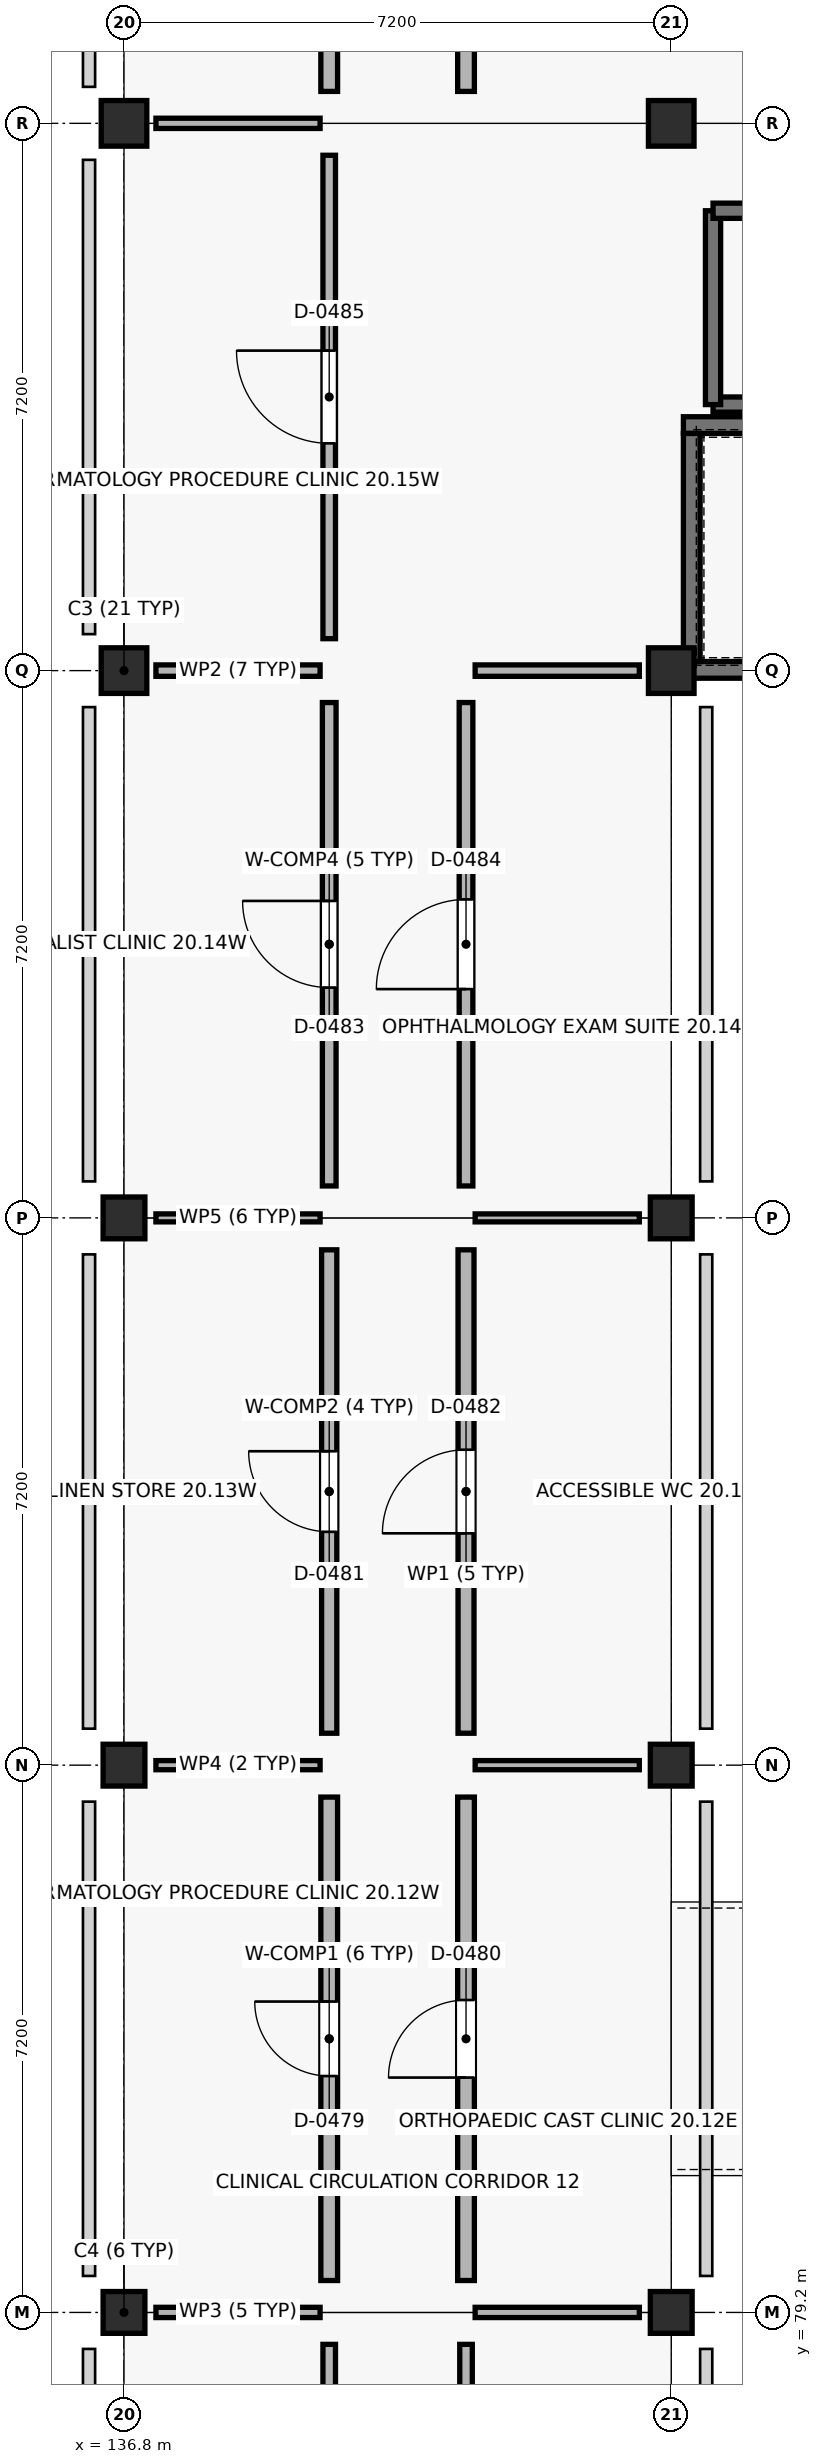
"""IFC4 building model, lengths in metres.
Left out: names, types, materials, properties, quantities, classifications, styles, units other than length and angle.
Written with IfcOpenShell. Run it as: python <this file> out.ifc"""

import sys

from ifc_helpers import new_model, si_unit, direction, frame, frame_2d, origin, origin_2d, place, context, subcontext, project, spatial, rectangle, extrude, element, fill, save


model = new_model("IFC4")
c1 = context("Model", 3, precision=1e-05, world=origin(), true_north=direction((0.0, 1.0)))
c2 = subcontext(c1, "Body", "Model", "MODEL_VIEW")
j1 = project(units=[si_unit("LENGTHUNIT", "METRE"), si_unit("PLANEANGLEUNIT", "RADIAN")], contexts=[c1])
p1 = place(None, origin())
s1 = spatial("IfcSite", under=j1, at=p1, CompositionType="ELEMENT")
p2 = place(p1, origin())
s2 = spatial("IfcBuilding", under=s1, at=p2, CompositionType="ELEMENT")
p3 = place(p2, frame((0.0, 0.0, 9.0)))
s3 = spatial("IfcBuildingStorey", under=s2, at=p3, CompositionType="ELEMENT", Elevation=9.0)
for number, where, z_axis, x_axis in (
    (1, (136.8, 79.2, 0.0), (0.0, 0.0, 1.0), (1.0, 0.0, 0.0)),
    (2, (136.8, 86.4, 0.0), (0.0, 0.0, 1.0), (1.0, 0.0, 0.0)),
    (3, (136.8, 93.6, 0.0), (0.0, 0.0, 1.0), (1.0, 0.0, 0.0)),
):
    element("IfcColumn", number, at=place(p3, frame(where, z_axis=z_axis, x_axis=x_axis)), inside=s3, PredefinedType="COLUMN", context=c2, shape_type="SweptSolid", body=[
        extrude(rectangle(XDim=0.55, YDim=0.55, at=origin_2d()), origin(), (0.0, 0.0, 1.0), 4.5),
    ])
for number, where, z_axis, x_axis in (
    (4, (136.8, 100.8, 0.0), (0.0, 0.0, 1.0), (1.0, 0.0, 0.0)),
    (5, (136.8, 108.0, 0.0), (0.0, 0.0, 1.0), (1.0, 0.0, 0.0)),
):
    element("IfcColumn", number, at=place(p3, frame(where, z_axis=z_axis, x_axis=x_axis)), inside=s3, PredefinedType="COLUMN", context=c2, shape_type="SweptSolid", body=[
        extrude(rectangle(XDim=0.6, YDim=0.6, at=origin_2d()), origin(), (0.0, 0.0, 1.0), 4.5),
    ])
for number, where, z_axis, x_axis in (
    (6, (144.0, 79.2, 0.0), (0.0, 0.0, 1.0), (1.0, 0.0, 0.0)),
    (7, (144.0, 86.4, 0.0), (0.0, 0.0, 1.0), (1.0, 0.0, 0.0)),
    (8, (144.0, 93.6, 0.0), (0.0, 0.0, 1.0), (1.0, 0.0, 0.0)),
):
    element("IfcColumn", number, at=place(p3, frame(where, z_axis=z_axis, x_axis=x_axis)), inside=s3, PredefinedType="COLUMN", context=c2, shape_type="SweptSolid", body=[
        extrude(rectangle(XDim=0.55, YDim=0.55, at=origin_2d()), origin(), (0.0, 0.0, 1.0), 4.5),
    ])
for number, where, z_axis, x_axis in (
    (9, (144.0, 100.8, 0.0), (0.0, 0.0, 1.0), (1.0, 0.0, 0.0)),
    (10, (144.0, 108.0, 0.0), (0.0, 0.0, 1.0), (1.0, 0.0, 0.0)),
):
    element("IfcColumn", number, at=place(p3, frame(where, z_axis=z_axis, x_axis=x_axis)), inside=s3, PredefinedType="COLUMN", context=c2, shape_type="SweptSolid", body=[
        extrude(rectangle(XDim=0.6, YDim=0.6, at=origin_2d()), origin(), (0.0, 0.0, 1.0), 4.5),
    ])
p4 = place(p3, frame((144.16, 100.81, 0.0), z_axis=(0.0, 0.0, 1.0), x_axis=(1.0, 0.0, 0.0)))
e11 = element("IfcWall", 11, at=p4, inside=s3, PredefinedType="SHEAR", context=c2, shape_type="SweptSolid", body=[
    extrude(rectangle(XDim=6.88, YDim=0.22, at=frame_2d((3.44, 0.0))), origin(), (0.0, 0.0, 1.0), 4.24),
])
p5 = place(p3, frame((144.16, 104.03, 0.0), z_axis=(0.0, 0.0, 1.0), x_axis=(1.0, 0.0, 0.0)))
e12 = element("IfcWall", 12, at=p5, inside=s3, PredefinedType="SHEAR", context=c2, shape_type="SweptSolid", body=[
    extrude(rectangle(XDim=6.88, YDim=0.22, at=frame_2d((3.44, 0.0))), origin(), (0.0, 0.0, 1.0), 4.24),
])
p6 = place(p5, frame((5.25, 0.0, 0.0)))
e13 = element("IfcOpeningElement", 13, at=p6, cuts=e12, PredefinedType="OPENING", context=c2, shape_type="SweptSolid", body=[
    extrude(rectangle(XDim=1.2, YDim=2.15, at=frame_2d((0.6, 1.075))), frame((0.0, 0.12, 0.0), z_axis=(0.0, -1.0, 0.0), x_axis=(1.0, 0.0, 0.0)), (0.0, 0.0, 1.0), 0.24),
])
p7 = place(p3, frame((144.27, 100.92, 0.0), z_axis=(0.0, 0.0, 1.0), x_axis=(0.0, 1.0, 0.0)))
e14 = element("IfcWall", 14, at=p7, inside=s3, PredefinedType="SHEAR", context=c2, shape_type="SweptSolid", body=[
    extrude(rectangle(XDim=3.0, YDim=0.22, at=frame_2d((1.5, 0.0))), origin(), (0.0, 0.0, 1.0), 4.24),
])
p8 = place(p3, frame((144.55, 104.3, 0.0), z_axis=(0.0, 0.0, 1.0), x_axis=(1.0, 0.0, 0.0)))
e15 = element("IfcWall", 15, at=p8, inside=s3, PredefinedType="SHEAR", context=c2, shape_type="SweptSolid", body=[
    extrude(rectangle(XDim=2.1, YDim=0.2, at=frame_2d((1.05, 0.0))), origin(), (0.0, 0.0, 1.0), 4.24),
])
p9 = place(p3, frame((144.55, 104.3, 0.0), z_axis=(0.0, 0.0, 1.0), x_axis=(0.0, 1.0, 0.0)))
e16 = element("IfcWall", 16, at=p9, inside=s3, PredefinedType="SHEAR", context=c2, shape_type="SweptSolid", body=[
    extrude(rectangle(XDim=2.55, YDim=0.2, at=frame_2d((1.275, 0.0))), origin(), (0.0, 0.0, 1.0), 4.24),
])
p10 = place(p3, frame((144.55, 106.85, 0.0), z_axis=(0.0, 0.0, 1.0), x_axis=(1.0, 0.0, 0.0)))
e17 = element("IfcWall", 17, at=p10, inside=s3, PredefinedType="SHEAR", context=c2, shape_type="SweptSolid", body=[
    extrude(rectangle(XDim=2.1, YDim=0.2, at=frame_2d((1.05, 0.0))), origin(), (0.0, 0.0, 1.0), 4.24),
])
p11 = place(p3, frame((139.5, 72.42, 0.0), z_axis=(0.0, 0.0, 1.0), x_axis=(0.0, 1.0, 0.0)))
e18 = element("IfcWall", 18, at=p11, inside=s3, PredefinedType="PARTITIONING", context=c2, shape_type="SweptSolid", body=[
    extrude(rectangle(XDim=6.36, YDim=0.165, at=frame_2d((3.18, 0.0))), origin(), (0.0, 0.0, 1.0), 3.38),
])
p12 = place(p11, frame((2.73, 0.0, 0.0)))
e19 = element("IfcOpeningElement", 19, at=p12, cuts=e18, PredefinedType="OPENING", context=c2, shape_type="SweptSolid", body=[
    extrude(rectangle(XDim=0.9, YDim=2.19, at=frame_2d((0.45, 1.095))), frame((0.0, 0.093, 0.0), z_axis=(0.0, -1.0, 0.0), x_axis=(1.0, 0.0, 0.0)), (0.0, 0.0, 1.0), 0.185),
])
p13 = place(p3, frame((137.22, 79.2, 0.0), z_axis=(0.0, 0.0, 1.0), x_axis=(1.0, 0.0, 0.0)))
e20 = element("IfcWall", 20, at=p13, inside=s3, PredefinedType="PARTITIONING", context=c2, shape_type="SweptSolid", body=[
    extrude(rectangle(XDim=2.16, YDim=0.135, at=frame_2d((1.08, 0.0))), origin(), (0.0, 0.0, 1.0), 3.38),
])
p14 = place(p3, frame((141.3, 72.42, 0.0), z_axis=(0.0, 0.0, 1.0), x_axis=(0.0, 1.0, 0.0)))
e21 = element("IfcWall", 21, at=p14, inside=s3, PredefinedType="PARTITIONING", context=c2, shape_type="SweptSolid", body=[
    extrude(rectangle(XDim=6.36, YDim=0.165, at=frame_2d((3.18, 0.0))), origin(), (0.0, 0.0, 1.0), 3.38),
])
p15 = place(p14, frame((2.71, 0.0, 0.0)))
e22 = element("IfcOpeningElement", 22, at=p15, cuts=e21, PredefinedType="OPENING", context=c2, shape_type="SweptSolid", body=[
    extrude(rectangle(XDim=0.94, YDim=2.19, at=frame_2d((0.47, 1.095))), frame((0.0, 0.093, 0.0), z_axis=(0.0, -1.0, 0.0), x_axis=(1.0, 0.0, 0.0)), (0.0, 0.0, 1.0), 0.185),
])
p16 = place(p3, frame((141.42, 79.2, 0.0), z_axis=(0.0, 0.0, 1.0), x_axis=(1.0, 0.0, 0.0)))
e23 = element("IfcWall", 23, at=p16, inside=s3, PredefinedType="PARTITIONING", context=c2, shape_type="SweptSolid", body=[
    extrude(rectangle(XDim=2.16, YDim=0.135, at=frame_2d((1.08, 0.0))), origin(), (0.0, 0.0, 1.0), 3.38),
])
p17 = place(p3, frame((139.5, 79.62, 0.0), z_axis=(0.0, 0.0, 1.0), x_axis=(0.0, 1.0, 0.0)))
e24 = element("IfcWall", 24, at=p17, inside=s3, PredefinedType="SOLIDWALL", context=c2, shape_type="SweptSolid", body=[
    extrude(rectangle(XDim=6.36, YDim=0.22, at=frame_2d((3.18, 0.0))), origin(), (0.0, 0.0, 1.0), 3.38),
])
p18 = place(p17, frame((2.69, 0.0, 0.0)))
e25 = element("IfcOpeningElement", 25, at=p18, cuts=e24, PredefinedType="OPENING", context=c2, shape_type="SweptSolid", body=[
    extrude(rectangle(XDim=0.98, YDim=2.19, at=frame_2d((0.49, 1.095))), frame((0.0, 0.12, 0.0), z_axis=(0.0, -1.0, 0.0), x_axis=(1.0, 0.0, 0.0)), (0.0, 0.0, 1.0), 0.24),
])
p19 = place(p3, frame((137.22, 86.4, 0.0), z_axis=(0.0, 0.0, 1.0), x_axis=(1.0, 0.0, 0.0)))
e26 = element("IfcWall", 26, at=p19, inside=s3, PredefinedType="PARTITIONING", context=c2, shape_type="SweptSolid", body=[
    extrude(rectangle(XDim=2.16, YDim=0.12, at=frame_2d((1.08, 0.0))), origin(), (0.0, 0.0, 1.0), 3.38),
])
p20 = place(p3, frame((141.3, 79.62, 0.0), z_axis=(0.0, 0.0, 1.0), x_axis=(0.0, 1.0, 0.0)))
e27 = element("IfcWall", 27, at=p20, inside=s3, PredefinedType="SOLIDWALL", context=c2, shape_type="SweptSolid", body=[
    extrude(rectangle(XDim=6.36, YDim=0.22, at=frame_2d((3.18, 0.0))), origin(), (0.0, 0.0, 1.0), 3.38),
])
p21 = place(p20, frame((2.67, 0.0, 0.0)))
e28 = element("IfcOpeningElement", 28, at=p21, cuts=e27, PredefinedType="OPENING", context=c2, shape_type="SweptSolid", body=[
    extrude(rectangle(XDim=1.02, YDim=2.19, at=frame_2d((0.51, 1.095))), frame((0.0, 0.12, 0.0), z_axis=(0.0, -1.0, 0.0), x_axis=(1.0, 0.0, 0.0)), (0.0, 0.0, 1.0), 0.24),
])
p22 = place(p3, frame((141.42, 86.4, 0.0), z_axis=(0.0, 0.0, 1.0), x_axis=(1.0, 0.0, 0.0)))
e29 = element("IfcWall", 29, at=p22, inside=s3, PredefinedType="PARTITIONING", context=c2, shape_type="SweptSolid", body=[
    extrude(rectangle(XDim=2.16, YDim=0.12, at=frame_2d((1.08, 0.0))), origin(), (0.0, 0.0, 1.0), 3.38),
])
p23 = place(p3, frame((139.5, 86.82, 0.0), z_axis=(0.0, 0.0, 1.0), x_axis=(0.0, 1.0, 0.0)))
e30 = element("IfcWall", 30, at=p23, inside=s3, PredefinedType="SOLIDWALL", context=c2, shape_type="SweptSolid", body=[
    extrude(rectangle(XDim=6.36, YDim=0.2, at=frame_2d((3.18, 0.0))), origin(), (0.0, 0.0, 1.0), 3.38),
])
p24 = place(p23, frame((2.65, 0.0, 0.0)))
e31 = element("IfcOpeningElement", 31, at=p24, cuts=e30, PredefinedType="OPENING", context=c2, shape_type="SweptSolid", body=[
    extrude(rectangle(XDim=1.06, YDim=2.19, at=frame_2d((0.53, 1.095))), frame((0.0, 0.11, 0.0), z_axis=(0.0, -1.0, 0.0), x_axis=(1.0, 0.0, 0.0)), (0.0, 0.0, 1.0), 0.22),
])
p25 = place(p3, frame((137.22, 93.6, 0.0), z_axis=(0.0, 0.0, 1.0), x_axis=(1.0, 0.0, 0.0)))
e32 = element("IfcWall", 32, at=p25, inside=s3, PredefinedType="PARTITIONING", context=c2, shape_type="SweptSolid", body=[
    extrude(rectangle(XDim=2.16, YDim=0.105, at=frame_2d((1.08, 0.0))), origin(), (0.0, 0.0, 1.0), 3.38),
])
p26 = place(p3, frame((141.3, 86.82, 0.0), z_axis=(0.0, 0.0, 1.0), x_axis=(0.0, 1.0, 0.0)))
e33 = element("IfcWall", 33, at=p26, inside=s3, PredefinedType="PLUMBINGWALL", context=c2, shape_type="SweptSolid", body=[
    extrude(rectangle(XDim=6.36, YDim=0.21, at=frame_2d((3.18, 0.0))), origin(), (0.0, 0.0, 1.0), 3.38),
])
p27 = place(p26, frame((2.63, 0.0, 0.0)))
e34 = element("IfcOpeningElement", 34, at=p27, cuts=e33, PredefinedType="OPENING", context=c2, shape_type="SweptSolid", body=[
    extrude(rectangle(XDim=1.1, YDim=2.19, at=frame_2d((0.55, 1.095))), frame((0.0, 0.115, 0.0), z_axis=(0.0, -1.0, 0.0), x_axis=(1.0, 0.0, 0.0)), (0.0, 0.0, 1.0), 0.23),
])
p28 = place(p3, frame((141.42, 93.6, 0.0), z_axis=(0.0, 0.0, 1.0), x_axis=(1.0, 0.0, 0.0)))
e35 = element("IfcWall", 35, at=p28, inside=s3, PredefinedType="PARTITIONING", context=c2, shape_type="SweptSolid", body=[
    extrude(rectangle(XDim=2.16, YDim=0.105, at=frame_2d((1.08, 0.0))), origin(), (0.0, 0.0, 1.0), 3.38),
])
p29 = place(p3, frame((139.5, 94.02, 0.0), z_axis=(0.0, 0.0, 1.0), x_axis=(0.0, 1.0, 0.0)))
e36 = element("IfcWall", 36, at=p29, inside=s3, PredefinedType="PARTITIONING", context=c2, shape_type="SweptSolid", body=[
    extrude(rectangle(XDim=6.36, YDim=0.18, at=frame_2d((3.18, 0.0))), origin(), (0.0, 0.0, 1.0), 3.38),
])
p30 = place(p29, frame((2.61, 0.0, 0.0)))
e37 = element("IfcOpeningElement", 37, at=p30, cuts=e36, PredefinedType="OPENING", context=c2, shape_type="SweptSolid", body=[
    extrude(rectangle(XDim=1.14, YDim=2.19, at=frame_2d((0.57, 1.095))), frame((0.0, 0.1, 0.0), z_axis=(0.0, -1.0, 0.0), x_axis=(1.0, 0.0, 0.0)), (0.0, 0.0, 1.0), 0.2),
])
p31 = place(p3, frame((137.22, 100.8, 0.0), z_axis=(0.0, 0.0, 1.0), x_axis=(1.0, 0.0, 0.0)))
e38 = element("IfcWall", 38, at=p31, inside=s3, PredefinedType="PARTITIONING", context=c2, shape_type="SweptSolid", body=[
    extrude(rectangle(XDim=2.16, YDim=0.15, at=frame_2d((1.08, 0.0))), origin(), (0.0, 0.0, 1.0), 3.38),
])
p32 = place(p3, frame((141.3, 94.02, 0.0), z_axis=(0.0, 0.0, 1.0), x_axis=(0.0, 1.0, 0.0)))
e39 = element("IfcWall", 39, at=p32, inside=s3, PredefinedType="PARTITIONING", context=c2, shape_type="SweptSolid", body=[
    extrude(rectangle(XDim=6.36, YDim=0.18, at=frame_2d((3.18, 0.0))), origin(), (0.0, 0.0, 1.0), 3.38),
])
p33 = place(p32, frame((2.59, 0.0, 0.0)))
e40 = element("IfcOpeningElement", 40, at=p33, cuts=e39, PredefinedType="OPENING", context=c2, shape_type="SweptSolid", body=[
    extrude(rectangle(XDim=1.18, YDim=2.19, at=frame_2d((0.59, 1.095))), frame((0.0, 0.1, 0.0), z_axis=(0.0, -1.0, 0.0), x_axis=(1.0, 0.0, 0.0)), (0.0, 0.0, 1.0), 0.2),
])
p34 = place(p3, frame((141.42, 100.8, 0.0), z_axis=(0.0, 0.0, 1.0), x_axis=(1.0, 0.0, 0.0)))
e41 = element("IfcWall", 41, at=p34, inside=s3, PredefinedType="PARTITIONING", context=c2, shape_type="SweptSolid", body=[
    extrude(rectangle(XDim=2.16, YDim=0.15, at=frame_2d((1.08, 0.0))), origin(), (0.0, 0.0, 1.0), 3.38),
])
p35 = place(p3, frame((139.5, 101.22, 0.0), z_axis=(0.0, 0.0, 1.0), x_axis=(0.0, 1.0, 0.0)))
e42 = element("IfcWall", 42, at=p35, inside=s3, PredefinedType="PARTITIONING", context=c2, shape_type="SweptSolid", body=[
    extrude(rectangle(XDim=6.36, YDim=0.165, at=frame_2d((3.18, 0.0))), origin(), (0.0, 0.0, 1.0), 3.38),
])
p36 = place(p35, frame((2.57, 0.0, 0.0)))
e43 = element("IfcOpeningElement", 43, at=p36, cuts=e42, PredefinedType="OPENING", context=c2, shape_type="SweptSolid", body=[
    extrude(rectangle(XDim=1.22, YDim=2.19, at=frame_2d((0.61, 1.095))), frame((0.0, 0.093, 0.0), z_axis=(0.0, -1.0, 0.0), x_axis=(1.0, 0.0, 0.0)), (0.0, 0.0, 1.0), 0.185),
])
p37 = place(p3, frame((137.22, 108.0, 0.0), z_axis=(0.0, 0.0, 1.0), x_axis=(1.0, 0.0, 0.0)))
e44 = element("IfcWall", 44, at=p37, inside=s3, PredefinedType="PARTITIONING", context=c2, shape_type="SweptSolid", body=[
    extrude(rectangle(XDim=2.16, YDim=0.135, at=frame_2d((1.08, 0.0))), origin(), (0.0, 0.0, 1.0), 3.38),
])
p38 = place(p3, frame((139.5, 108.42, 0.0), z_axis=(0.0, 0.0, 1.0), x_axis=(0.0, 1.0, 0.0)))
e45 = element("IfcWall", 45, at=p38, inside=s3, PredefinedType="SOLIDWALL", context=c2, shape_type="SweptSolid", body=[
    extrude(rectangle(XDim=6.36, YDim=0.22, at=frame_2d((3.18, 0.0))), origin(), (0.0, 0.0, 1.0), 3.38),
])
p39 = place(p38, frame((2.55, 0.0, 0.0)))
e46 = element("IfcOpeningElement", 46, at=p39, cuts=e45, PredefinedType="OPENING", context=c2, shape_type="SweptSolid", body=[
    extrude(rectangle(XDim=1.26, YDim=2.19, at=frame_2d((0.63, 1.095))), frame((0.0, 0.12, 0.0), z_axis=(0.0, -1.0, 0.0), x_axis=(1.0, 0.0, 0.0)), (0.0, 0.0, 1.0), 0.24),
])
p40 = place(p3, frame((141.3, 108.42, 0.0), z_axis=(0.0, 0.0, 1.0), x_axis=(0.0, 1.0, 0.0)))
e47 = element("IfcWall", 47, at=p40, inside=s3, PredefinedType="SOLIDWALL", context=c2, shape_type="SweptSolid", body=[
    extrude(rectangle(XDim=6.36, YDim=0.22, at=frame_2d((3.18, 0.0))), origin(), (0.0, 0.0, 1.0), 3.38),
])
p41 = place(p40, frame((2.53, 0.0, 0.0)))
e48 = element("IfcOpeningElement", 48, at=p41, cuts=e47, PredefinedType="OPENING", context=c2, shape_type="SweptSolid", body=[
    extrude(rectangle(XDim=1.3, YDim=2.19, at=frame_2d((0.65, 1.095))), frame((0.0, 0.12, 0.0), z_axis=(0.0, -1.0, 0.0), x_axis=(1.0, 0.0, 0.0)), (0.0, 0.0, 1.0), 0.24),
])
p42 = place(p18, origin())
e49 = element("IfcDoor", 49, at=p42, inside=s3, OperationType="SINGLE_SWING_RIGHT", PredefinedType="DOOR", context=c2, shape_type="SweptSolid", body=[
    extrude(rectangle(XDim=0.98, YDim=2.19, at=frame_2d((0.49, 1.095))), frame((0.0, 0.025, 0.0), z_axis=(0.0, -1.0, 0.0), x_axis=(1.0, 0.0, 0.0)), (0.0, 0.0, 1.0), 0.05),
])
fill(e25, e49)
p43 = place(p21, origin())
e50 = element("IfcDoor", 50, at=p43, inside=s3, OperationType="SINGLE_SWING_LEFT", PredefinedType="DOOR", context=c2, shape_type="SweptSolid", body=[
    extrude(rectangle(XDim=1.02, YDim=2.19, at=frame_2d((0.51, 1.095))), frame((0.0, 0.025, 0.0), z_axis=(0.0, -1.0, 0.0), x_axis=(1.0, 0.0, 0.0)), (0.0, 0.0, 1.0), 0.05),
])
fill(e28, e50)
p44 = place(p24, origin())
e51 = element("IfcDoor", 51, at=p44, inside=s3, OperationType="SINGLE_SWING_RIGHT", PredefinedType="DOOR", context=c2, shape_type="SweptSolid", body=[
    extrude(rectangle(XDim=1.06, YDim=2.19, at=frame_2d((0.53, 1.095))), frame((0.0, 0.025, 0.0), z_axis=(0.0, -1.0, 0.0), x_axis=(1.0, 0.0, 0.0)), (0.0, 0.0, 1.0), 0.05),
])
fill(e31, e51)
p45 = place(p27, origin())
e52 = element("IfcDoor", 52, at=p45, inside=s3, OperationType="SINGLE_SWING_LEFT", PredefinedType="DOOR", context=c2, shape_type="SweptSolid", body=[
    extrude(rectangle(XDim=1.1, YDim=2.19, at=frame_2d((0.55, 1.095))), frame((0.0, 0.025, 0.0), z_axis=(0.0, -1.0, 0.0), x_axis=(1.0, 0.0, 0.0)), (0.0, 0.0, 1.0), 0.05),
])
fill(e34, e52)
p46 = place(p30, origin())
e53 = element("IfcDoor", 53, at=p46, inside=s3, OperationType="SINGLE_SWING_RIGHT", PredefinedType="DOOR", context=c2, shape_type="SweptSolid", body=[
    extrude(rectangle(XDim=1.14, YDim=2.19, at=frame_2d((0.57, 1.095))), frame((0.0, 0.025, 0.0), z_axis=(0.0, -1.0, 0.0), x_axis=(1.0, 0.0, 0.0)), (0.0, 0.0, 1.0), 0.05),
])
fill(e37, e53)
p47 = place(p33, origin())
e54 = element("IfcDoor", 54, at=p47, inside=s3, OperationType="SINGLE_SWING_LEFT", PredefinedType="DOOR", context=c2, shape_type="SweptSolid", body=[
    extrude(rectangle(XDim=1.18, YDim=2.19, at=frame_2d((0.59, 1.095))), frame((0.0, 0.025, 0.0), z_axis=(0.0, -1.0, 0.0), x_axis=(1.0, 0.0, 0.0)), (0.0, 0.0, 1.0), 0.05),
])
fill(e40, e54)
p48 = place(p36, origin())
e55 = element("IfcDoor", 55, at=p48, inside=s3, OperationType="SINGLE_SWING_RIGHT", PredefinedType="DOOR", context=c2, shape_type="SweptSolid", body=[
    extrude(rectangle(XDim=1.22, YDim=2.19, at=frame_2d((0.61, 1.095))), frame((0.0, 0.025, 0.0), z_axis=(0.0, -1.0, 0.0), x_axis=(1.0, 0.0, 0.0)), (0.0, 0.0, 1.0), 0.05),
])
fill(e43, e55)
save(model, sys.argv[1])
